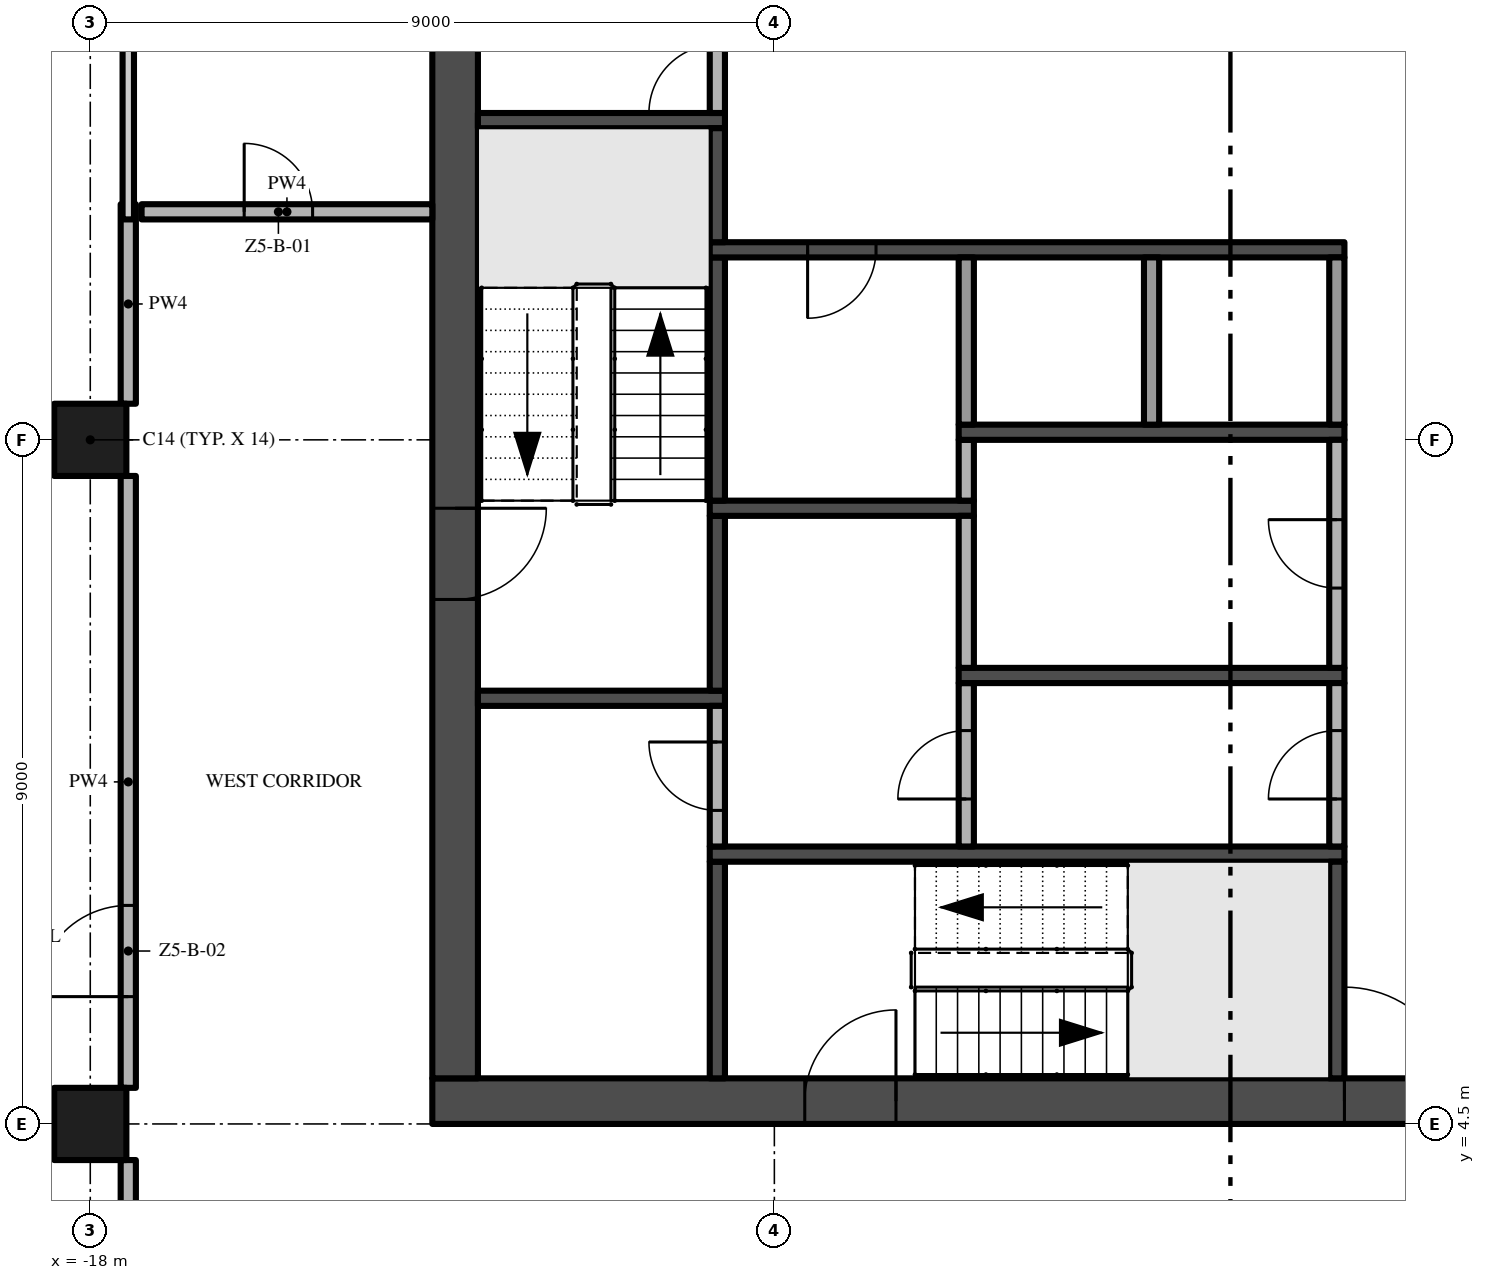
"""IFC4 building model, lengths in metres.
Left out: names, types, materials, properties, quantities, classifications, styles, units other than length and angle.
Written with IfcOpenShell. Run it as: python <this file> out.ifc"""

import sys

from ifc_helpers import new_model, si_unit, direction, frame, frame_2d, origin, origin_2d, place, context, subcontext, project, spatial, rectangle, extrude, element, fill, save


model = new_model("IFC4")
c1 = context("Model", 3, precision=1e-05, world=origin(), true_north=direction((0.0, 1.0)))
c2 = subcontext(c1, "Body", "Model", "MODEL_VIEW")
j1 = project(units=[si_unit("LENGTHUNIT", "METRE"), si_unit("PLANEANGLEUNIT", "RADIAN")], contexts=[c1])
p1 = place(None, origin())
s1 = spatial("IfcSite", under=j1, at=p1, CompositionType="ELEMENT")
p2 = place(p1, origin())
s2 = spatial("IfcBuilding", under=s1, at=p2, CompositionType="ELEMENT")
p3 = place(p2, frame((0.0, 0.0, 257.8)))
s3 = spatial("IfcBuildingStorey", under=s2, at=p3, CompositionType="ELEMENT", Elevation=257.8)
p4 = place(p3, frame((-13.5, 4.8, -0.3), z_axis=(0.0, 0.0, 1.0), x_axis=(1.0, 0.0, 0.0)))
e1 = element("IfcWall", 1, at=p4, inside=s3, PredefinedType="SHEAR", context=c2, shape_type="SweptSolid", body=[
    extrude(rectangle(XDim=27.0, YDim=0.6, at=frame_2d((13.5, 0.0))), origin(), (0.0, 0.0, 1.0), 3.8),
])
p5 = place(p4, frame((12.0, 0.0, 0.3)))
e2 = element("IfcOpeningElement", 2, at=p5, cuts=e1, PredefinedType="OPENING", context=c2, shape_type="SweptSolid", body=[
    extrude(rectangle(XDim=3.0, YDim=2.4, at=frame_2d((1.5, 1.2))), frame((0.0, 0.31, 0.0), z_axis=(0.0, -1.0, 0.0), x_axis=(1.0, 0.0, 0.0)), (0.0, 0.0, 1.0), 0.62),
])
p6 = place(p4, frame((4.9, 0.0, 0.3)))
e3 = element("IfcOpeningElement", 3, at=p6, cuts=e1, PredefinedType="OPENING", context=c2, shape_type="SweptSolid", body=[
    extrude(rectangle(XDim=1.2, YDim=2.2, at=frame_2d((0.6, 1.1))), frame((0.0, 0.31, 0.0), z_axis=(0.0, -1.0, 0.0), x_axis=(1.0, 0.0, 0.0)), (0.0, 0.0, 1.0), 0.62),
])
p7 = place(p4, frame((20.75, 0.0, 0.3)))
e4 = element("IfcOpeningElement", 4, at=p7, cuts=e1, PredefinedType="OPENING", context=c2, shape_type="SweptSolid", body=[
    extrude(rectangle(XDim=1.5, YDim=2.2, at=frame_2d((0.75, 1.1))), frame((0.0, 0.31, 0.0), z_axis=(0.0, -1.0, 0.0), x_axis=(1.0, 0.0, 0.0)), (0.0, 0.0, 1.0), 0.62),
])
p8 = place(p4, frame((17.4, 0.0, 0.3)))
e5 = element("IfcOpeningElement", 5, at=p8, cuts=e1, PredefinedType="OPENING", context=c2, shape_type="SweptSolid", body=[
    extrude(rectangle(XDim=1.2, YDim=2.2, at=frame_2d((0.6, 1.1))), frame((0.0, 0.31, 0.0), z_axis=(0.0, -1.0, 0.0), x_axis=(1.0, 0.0, 0.0)), (0.0, 0.0, 1.0), 0.62),
])
p9 = place(p3, frame((-13.2, 21.9, -0.3), z_axis=(0.0, 0.0, 1.0), x_axis=(0.0, -1.0, 0.0)))
e6 = element("IfcWall", 6, at=p9, inside=s3, PredefinedType="SHEAR", context=c2, shape_type="SweptSolid", body=[
    extrude(rectangle(XDim=16.8, YDim=0.6, at=frame_2d((8.4, 0.0))), origin(), (0.0, 0.0, 1.0), 3.8),
])
p10 = place(p9, frame((9.3, 0.0, 0.3)))
e7 = element("IfcOpeningElement", 7, at=p10, cuts=e6, PredefinedType="OPENING", context=c2, shape_type="SweptSolid", body=[
    extrude(rectangle(XDim=1.2, YDim=2.2, at=frame_2d((0.6, 1.1))), frame((0.0, 0.31, 0.0), z_axis=(0.0, -1.0, 0.0), x_axis=(1.0, 0.0, 0.0)), (0.0, 0.0, 1.0), 0.62),
])
for number, where, z_axis, x_axis in (
    (8, (-18.0, 13.5, 0.0), (0.0, 0.0, 1.0), (1.0, 0.0, 0.0)),
    (9, (-18.0, 4.5, 0.0), (0.0, 0.0, 1.0), (1.0, 0.0, 0.0)),
):
    element("IfcColumn", number, at=place(p3, frame(where, z_axis=z_axis, x_axis=x_axis)), inside=s3, PredefinedType="COLUMN", context=c2, shape_type="SweptSolid", body=[
        extrude(rectangle(XDim=0.95, YDim=0.95, at=origin_2d()), origin(), (0.0, 0.0, 1.0), 3.5),
    ])
for number, where, z_axis, x_axis in (
    (10, (-12.9, 10.1, 0.0), (0.0, 0.0, 1.0), (1.0, 0.0, 0.0)),
    (11, (-12.9, 17.7, 0.0), (0.0, 0.0, 1.0), (1.0, 0.0, 0.0)),
):
    element("IfcWall", number, at=place(p3, frame(where, z_axis=z_axis, x_axis=x_axis)), inside=s3, PredefinedType="SHEAR", context=c2, shape_type="SweptSolid", body=[
        extrude(rectangle(XDim=3.25, YDim=0.2, at=frame_2d((1.625, 0.0))), origin(), (0.0, 0.0, 1.0), 3.5),
    ])
p11 = place(p3, frame((-9.75, 5.1, 0.0), z_axis=(0.0, 0.0, 1.0), x_axis=(0.0, 1.0, 0.0)))
e12 = element("IfcWall", 12, at=p11, inside=s3, PredefinedType="SHEAR", context=c2, shape_type="SweptSolid", body=[
    extrude(rectangle(XDim=2.85, YDim=0.2, at=frame_2d((1.425, 0.0))), origin(), (0.0, 0.0, 1.0), 3.5),
])
p12 = place(p3, frame((-9.85, 8.05, 0.0), z_axis=(0.0, 0.0, 1.0), x_axis=(1.0, 0.0, 0.0)))
e13 = element("IfcWall", 13, at=p12, inside=s3, PredefinedType="SHEAR", context=c2, shape_type="SweptSolid", body=[
    extrude(rectangle(XDim=8.35, YDim=0.2, at=frame_2d((4.175, 0.0))), origin(), (0.0, 0.0, 1.0), 3.5),
])
p13 = place(p3, frame((-9.75, 8.15, 0.0), z_axis=(0.0, 0.0, 1.0), x_axis=(0.0, 1.0, 0.0)))
e14 = element("IfcWall", 14, at=p13, inside=s3, PredefinedType="PARTITIONING", context=c2, shape_type="SweptSolid", body=[
    extrude(rectangle(XDim=1.85, YDim=0.2, at=frame_2d((0.925, 0.0))), origin(), (0.0, 0.0, 1.0), 3.5),
])
p14 = place(p13, frame((0.475, 0.0, 0.0)))
e15 = element("IfcOpeningElement", 15, at=p14, cuts=e14, PredefinedType="OPENING", context=c2, shape_type="SweptSolid", body=[
    extrude(rectangle(XDim=0.9, YDim=2.1, at=frame_2d((0.45, 1.05))), frame((0.0, 0.11, 0.0), z_axis=(0.0, -1.0, 0.0), x_axis=(1.0, 0.0, 0.0)), (0.0, 0.0, 1.0), 0.22),
])
p15 = place(p3, frame((-9.75, 10.2, 0.0), z_axis=(0.0, 0.0, 1.0), x_axis=(0.0, 1.0, 0.0)))
e16 = element("IfcWall", 16, at=p15, inside=s3, PredefinedType="SHEAR", context=c2, shape_type="SweptSolid", body=[
    extrude(rectangle(XDim=2.3, YDim=0.2, at=frame_2d((1.15, 0.0))), origin(), (0.0, 0.0, 1.0), 3.5),
])
p16 = place(p3, frame((-9.85, 12.6, 0.0), z_axis=(0.0, 0.0, 1.0), x_axis=(1.0, 0.0, 0.0)))
e17 = element("IfcWall", 17, at=p16, inside=s3, PredefinedType="SHEAR", context=c2, shape_type="SweptSolid", body=[
    extrude(rectangle(XDim=3.475, YDim=0.2, at=frame_2d((1.738, 0.0))), origin(), (0.0, 0.0, 1.0), 3.5),
])
p17 = place(p3, frame((-9.75, 12.7, 0.0), z_axis=(0.0, 0.0, 1.0), x_axis=(0.0, 1.0, 0.0)))
e18 = element("IfcWall", 18, at=p17, inside=s3, PredefinedType="SHEAR", context=c2, shape_type="SweptSolid", body=[
    extrude(rectangle(XDim=3.2, YDim=0.2, at=frame_2d((1.6, 0.0))), origin(), (0.0, 0.0, 1.0), 3.5),
])
p18 = place(p3, frame((-1.5, 16.0, 0.0), z_axis=(0.0, 0.0, 1.0), x_axis=(-1.0, 0.0, 0.0)))
e19 = element("IfcWall", 19, at=p18, inside=s3, PredefinedType="SHEAR", context=c2, shape_type="SweptSolid", body=[
    extrude(rectangle(XDim=8.35, YDim=0.2, at=frame_2d((4.175, 0.0))), origin(), (0.0, 0.0, 1.0), 3.5),
])
p19 = place(p18, frame((6.162, 0.0, 0.0)))
e20 = element("IfcOpeningElement", 20, at=p19, cuts=e19, PredefinedType="OPENING", context=c2, shape_type="SweptSolid", body=[
    extrude(rectangle(XDim=0.9, YDim=2.1, at=frame_2d((0.45, 1.05))), frame((0.0, 0.11, 0.0), z_axis=(0.0, -1.0, 0.0), x_axis=(1.0, 0.0, 0.0)), (0.0, 0.0, 1.0), 0.22),
])
p20 = place(p3, frame((-9.75, 16.1, 0.0), z_axis=(0.0, 0.0, 1.0), x_axis=(0.0, 1.0, 0.0)))
e21 = element("IfcWall", 21, at=p20, inside=s3, PredefinedType="SHEAR", context=c2, shape_type="SweptSolid", body=[
    extrude(rectangle(XDim=1.5, YDim=0.2, at=frame_2d((0.75, 0.0))), origin(), (0.0, 0.0, 1.0), 3.5),
])
p21 = place(p3, frame((-9.75, 17.8, 0.0), z_axis=(0.0, 0.0, 1.0), x_axis=(0.0, 1.0, 0.0)))
e22 = element("IfcWall", 22, at=p21, inside=s3, PredefinedType="PARTITIONING", context=c2, shape_type="SweptSolid", body=[
    extrude(rectangle(XDim=1.4, YDim=0.2, at=frame_2d((0.7, 0.0))), origin(), (0.0, 0.0, 1.0), 3.5),
])
p22 = place(p21, origin())
e23 = element("IfcOpeningElement", 23, at=p22, cuts=e22, PredefinedType="OPENING", context=c2, shape_type="SweptSolid", body=[
    extrude(rectangle(XDim=0.9, YDim=2.1, at=frame_2d((0.45, 1.05))), frame((0.0, 0.11, 0.0), z_axis=(0.0, -1.0, 0.0), x_axis=(1.0, 0.0, 0.0)), (0.0, 0.0, 1.0), 0.22),
])
p23 = place(p3, frame((-6.475, 8.15, 0.0), z_axis=(0.0, 0.0, 1.0), x_axis=(0.0, 1.0, 0.0)))
e24 = element("IfcWall", 24, at=p23, inside=s3, PredefinedType="PARTITIONING", context=c2, shape_type="SweptSolid", body=[
    extrude(rectangle(XDim=2.15, YDim=0.2, at=frame_2d((1.075, 0.0))), origin(), (0.0, 0.0, 1.0), 3.5),
])
p24 = place(p23, frame((0.625, 0.0, 0.0)))
e25 = element("IfcOpeningElement", 25, at=p24, cuts=e24, PredefinedType="OPENING", context=c2, shape_type="SweptSolid", body=[
    extrude(rectangle(XDim=0.9, YDim=2.1, at=frame_2d((0.45, 1.05))), frame((0.0, 0.11, 0.0), z_axis=(0.0, -1.0, 0.0), x_axis=(1.0, 0.0, 0.0)), (0.0, 0.0, 1.0), 0.22),
])
p25 = place(p3, frame((-6.575, 10.4, 0.0), z_axis=(0.0, 0.0, 1.0), x_axis=(1.0, 0.0, 0.0)))
e26 = element("IfcWall", 26, at=p25, inside=s3, PredefinedType="SHEAR", context=c2, shape_type="SweptSolid", body=[
    extrude(rectangle(XDim=5.075, YDim=0.2, at=frame_2d((2.538, 0.0))), origin(), (0.0, 0.0, 1.0), 3.5),
])
p26 = place(p3, frame((-6.475, 10.5, 0.0), z_axis=(0.0, 0.0, 1.0), x_axis=(0.0, 1.0, 0.0)))
e27 = element("IfcWall", 27, at=p26, inside=s3, PredefinedType="PARTITIONING", context=c2, shape_type="SweptSolid", body=[
    extrude(rectangle(XDim=2.0, YDim=0.2, at=frame_2d((1.0, 0.0))), origin(), (0.0, 0.0, 1.0), 3.5),
])
p27 = place(p3, frame((-6.475, 12.7, 0.0), z_axis=(0.0, 0.0, 1.0), x_axis=(0.0, 1.0, 0.0)))
e28 = element("IfcWall", 28, at=p27, inside=s3, PredefinedType="PARTITIONING", context=c2, shape_type="SweptSolid", body=[
    extrude(rectangle(XDim=0.8, YDim=0.2, at=frame_2d((0.4, 0.0))), origin(), (0.0, 0.0, 1.0), 3.5),
])
p28 = place(p3, frame((-6.575, 13.6, 0.0), z_axis=(0.0, 0.0, 1.0), x_axis=(1.0, 0.0, 0.0)))
e29 = element("IfcWall", 29, at=p28, inside=s3, PredefinedType="SHEAR", context=c2, shape_type="SweptSolid", body=[
    extrude(rectangle(XDim=5.075, YDim=0.2, at=frame_2d((2.538, 0.0))), origin(), (0.0, 0.0, 1.0), 3.5),
])
for number, where, z_axis, x_axis in (
    (30, (-6.475, 13.7, 0.0), (0.0, 0.0, 1.0), (0.0, 1.0, 0.0)),
    (31, (-4.037, 13.7, 0.0), (0.0, 0.0, 1.0), (0.0, 1.0, 0.0)),
):
    element("IfcWall", number, at=place(p3, frame(where, z_axis=z_axis, x_axis=x_axis)), inside=s3, PredefinedType="PARTITIONING", context=c2, shape_type="SweptSolid", body=[
        extrude(rectangle(XDim=2.2, YDim=0.2, at=frame_2d((1.1, 0.0))), origin(), (0.0, 0.0, 1.0), 3.5),
    ])
p29 = place(p3, frame((-1.6, 5.1, 0.0), z_axis=(0.0, 0.0, 1.0), x_axis=(0.0, 1.0, 0.0)))
e32 = element("IfcWall", 32, at=p29, inside=s3, PredefinedType="SHEAR", context=c2, shape_type="SweptSolid", body=[
    extrude(rectangle(XDim=2.85, YDim=0.2, at=frame_2d((1.425, 0.0))), origin(), (0.0, 0.0, 1.0), 3.5),
])
p30 = place(p3, frame((-1.6, 8.15, 0.0), z_axis=(0.0, 0.0, 1.0), x_axis=(0.0, 1.0, 0.0)))
e33 = element("IfcWall", 33, at=p30, inside=s3, PredefinedType="PARTITIONING", context=c2, shape_type="SweptSolid", body=[
    extrude(rectangle(XDim=2.15, YDim=0.2, at=frame_2d((1.075, 0.0))), origin(), (0.0, 0.0, 1.0), 3.5),
])
p31 = place(p30, frame((0.625, 0.0, 0.0)))
e34 = element("IfcOpeningElement", 34, at=p31, cuts=e33, PredefinedType="OPENING", context=c2, shape_type="SweptSolid", body=[
    extrude(rectangle(XDim=0.9, YDim=2.1, at=frame_2d((0.45, 1.05))), frame((0.0, 0.11, 0.0), z_axis=(0.0, -1.0, 0.0), x_axis=(1.0, 0.0, 0.0)), (0.0, 0.0, 1.0), 0.22),
])
p32 = place(p3, frame((-1.6, 10.5, 0.0), z_axis=(0.0, 0.0, 1.0), x_axis=(0.0, 1.0, 0.0)))
e35 = element("IfcWall", 35, at=p32, inside=s3, PredefinedType="PARTITIONING", context=c2, shape_type="SweptSolid", body=[
    extrude(rectangle(XDim=3.0, YDim=0.2, at=frame_2d((1.5, 0.0))), origin(), (0.0, 0.0, 1.0), 3.5),
])
p33 = place(p32, frame((1.05, 0.0, 0.0)))
e36 = element("IfcOpeningElement", 36, at=p33, cuts=e35, PredefinedType="OPENING", context=c2, shape_type="SweptSolid", body=[
    extrude(rectangle(XDim=0.9, YDim=2.1, at=frame_2d((0.45, 1.05))), frame((0.0, 0.11, 0.0), z_axis=(0.0, -1.0, 0.0), x_axis=(1.0, 0.0, 0.0)), (0.0, 0.0, 1.0), 0.22),
])
p34 = place(p3, frame((-1.6, 13.7, 0.0), z_axis=(0.0, 0.0, 1.0), x_axis=(0.0, 1.0, 0.0)))
e37 = element("IfcWall", 37, at=p34, inside=s3, PredefinedType="PARTITIONING", context=c2, shape_type="SweptSolid", body=[
    extrude(rectangle(XDim=2.2, YDim=0.2, at=frame_2d((1.1, 0.0))), origin(), (0.0, 0.0, 1.0), 3.5),
])
p35 = place(p3, frame((-17.325, 16.5, 0.0), z_axis=(0.0, 0.0, 1.0), x_axis=(1.0, 0.0, 0.0)))
e38 = element("IfcWall", 38, at=p35, inside=s3, PredefinedType="PARTITIONING", context=c2, shape_type="SweptSolid", body=[
    extrude(rectangle(XDim=3.825, YDim=0.2, at=frame_2d((1.913, 0.0))), origin(), (0.0, 0.0, 1.0), 3.5),
])
p36 = place(p35, frame((1.35, 0.0, 0.0)))
e39 = element("IfcOpeningElement", 39, at=p36, cuts=e38, PredefinedType="OPENING", context=c2, shape_type="SweptSolid", body=[
    extrude(rectangle(XDim=0.9, YDim=2.1, at=frame_2d((0.45, 1.05))), frame((0.0, 0.11, 0.0), z_axis=(0.0, -1.0, 0.0), x_axis=(1.0, 0.0, 0.0)), (0.0, 0.0, 1.0), 0.22),
])
p37 = place(p3, frame((-17.5, -0.2, 0.0), z_axis=(0.0, 0.0, 1.0), x_axis=(0.0, 1.0, 0.0)))
e40 = element("IfcWall", 40, at=p37, inside=s3, PredefinedType="PARTITIONING", context=c2, shape_type="SweptSolid", body=[
    extrude(rectangle(XDim=4.225, YDim=0.2, at=frame_2d((2.112, 0.0))), origin(), (0.0, 0.0, 1.0), 3.5),
])
p38 = place(p3, frame((-17.5, 4.975, 0.0), z_axis=(0.0, 0.0, 1.0), x_axis=(0.0, 1.0, 0.0)))
e41 = element("IfcWall", 41, at=p38, inside=s3, PredefinedType="PARTITIONING", context=c2, shape_type="SweptSolid", body=[
    extrude(rectangle(XDim=8.05, YDim=0.2, at=frame_2d((4.025, 0.0))), origin(), (0.0, 0.0, 1.0), 3.5),
])
p39 = place(p38, frame((1.2, 0.0, 0.0)))
e42 = element("IfcOpeningElement", 42, at=p39, cuts=e41, PredefinedType="OPENING", context=c2, shape_type="SweptSolid", body=[
    extrude(rectangle(XDim=1.2, YDim=2.4, at=frame_2d((0.6, 1.2))), frame((0.0, 0.11, 0.0), z_axis=(0.0, -1.0, 0.0), x_axis=(1.0, 0.0, 0.0)), (0.0, 0.0, 1.0), 0.22),
])
p40 = place(p3, frame((-17.5, 13.975, 0.0), z_axis=(0.0, 0.0, 1.0), x_axis=(0.0, 1.0, 0.0)))
e43 = element("IfcWall", 43, at=p40, inside=s3, PredefinedType="PARTITIONING", context=c2, shape_type="SweptSolid", body=[
    extrude(rectangle(XDim=2.625, YDim=0.2, at=frame_2d((1.312, 0.0))), origin(), (0.0, 0.0, 1.0), 3.5),
])
p41 = place(p3, frame((-17.5, 16.4, 0.0), z_axis=(0.0, 0.0, 1.0), x_axis=(0.0, 1.0, 0.0)))
e44 = element("IfcWall", 44, at=p41, inside=s3, PredefinedType="PARTITIONING", context=c2, shape_type="SweptSolid", body=[
    extrude(rectangle(XDim=5.2, YDim=0.15, at=frame_2d((2.6, 0.0))), origin(), (0.0, 0.0, 1.0), 3.5),
])
p42 = place(p5, frame((3.0, 0.0, 0.0), z_axis=(0.0, 0.0, 1.0), x_axis=(-1.0, 0.0, 0.0)))
e45 = element("IfcDoor", 45, at=p42, inside=s3, OperationType="DOUBLE_DOOR_SINGLE_SWING", PredefinedType="DOOR", context=c2, shape_type="SweptSolid", body=[
    extrude(rectangle(XDim=3.0, YDim=2.4, at=frame_2d((1.5, 1.2))), frame((0.0, 0.025, 0.0), z_axis=(0.0, -1.0, 0.0), x_axis=(1.0, 0.0, 0.0)), (0.0, 0.0, 1.0), 0.05),
])
fill(e2, e45)
p43 = place(p10, frame((1.2, 0.0, 0.0), z_axis=(0.0, 0.0, 1.0), x_axis=(-1.0, 0.0, 0.0)))
e46 = element("IfcDoor", 46, at=p43, inside=s3, OperationType="SINGLE_SWING_RIGHT", PredefinedType="DOOR", context=c2, shape_type="SweptSolid", body=[
    extrude(rectangle(XDim=1.2, YDim=2.2, at=frame_2d((0.6, 1.1))), frame((0.0, 0.025, 0.0), z_axis=(0.0, -1.0, 0.0), x_axis=(1.0, 0.0, 0.0)), (0.0, 0.0, 1.0), 0.05),
])
fill(e7, e46)
p44 = place(p6, frame((1.2, 0.0, 0.0), z_axis=(0.0, 0.0, 1.0), x_axis=(-1.0, 0.0, 0.0)))
e47 = element("IfcDoor", 47, at=p44, inside=s3, OperationType="SINGLE_SWING_LEFT", PredefinedType="DOOR", context=c2, shape_type="SweptSolid", body=[
    extrude(rectangle(XDim=1.2, YDim=2.2, at=frame_2d((0.6, 1.1))), frame((0.0, 0.025, 0.0), z_axis=(0.0, -1.0, 0.0), x_axis=(1.0, 0.0, 0.0)), (0.0, 0.0, 1.0), 0.05),
])
fill(e3, e47)
p45 = place(p19, origin())
e48 = element("IfcDoor", 48, at=p45, inside=s3, OperationType="SINGLE_SWING_RIGHT", PredefinedType="DOOR", context=c2, shape_type="SweptSolid", body=[
    extrude(rectangle(XDim=0.9, YDim=2.1, at=frame_2d((0.45, 1.05))), frame((0.0, 0.025, 0.0), z_axis=(0.0, -1.0, 0.0), x_axis=(1.0, 0.0, 0.0)), (0.0, 0.0, 1.0), 0.05),
])
fill(e20, e48)
p46 = place(p31, origin())
e49 = element("IfcDoor", 49, at=p46, inside=s3, OperationType="SINGLE_SWING_LEFT", PredefinedType="DOOR", context=c2, shape_type="SweptSolid", body=[
    extrude(rectangle(XDim=0.9, YDim=2.1, at=frame_2d((0.45, 1.05))), frame((0.0, 0.025, 0.0), z_axis=(0.0, -1.0, 0.0), x_axis=(1.0, 0.0, 0.0)), (0.0, 0.0, 1.0), 0.05),
])
fill(e34, e49)
p47 = place(p33, origin())
e50 = element("IfcDoor", 50, at=p47, inside=s3, OperationType="SINGLE_SWING_RIGHT", PredefinedType="DOOR", context=c2, shape_type="SweptSolid", body=[
    extrude(rectangle(XDim=0.9, YDim=2.1, at=frame_2d((0.45, 1.05))), frame((0.0, 0.025, 0.0), z_axis=(0.0, -1.0, 0.0), x_axis=(1.0, 0.0, 0.0)), (0.0, 0.0, 1.0), 0.05),
])
fill(e36, e50)
p48 = place(p22, origin())
e51 = element("IfcDoor", 51, at=p48, inside=s3, OperationType="SINGLE_SWING_LEFT", PredefinedType="DOOR", context=c2, shape_type="SweptSolid", body=[
    extrude(rectangle(XDim=0.9, YDim=2.1, at=frame_2d((0.45, 1.05))), frame((0.0, 0.025, 0.0), z_axis=(0.0, -1.0, 0.0), x_axis=(1.0, 0.0, 0.0)), (0.0, 0.0, 1.0), 0.05),
])
fill(e23, e51)
p49 = place(p24, origin())
e52 = element("IfcDoor", 52, at=p49, inside=s3, OperationType="SINGLE_SWING_LEFT", PredefinedType="DOOR", context=c2, shape_type="SweptSolid", body=[
    extrude(rectangle(XDim=0.9, YDim=2.1, at=frame_2d((0.45, 1.05))), frame((0.0, 0.025, 0.0), z_axis=(0.0, -1.0, 0.0), x_axis=(1.0, 0.0, 0.0)), (0.0, 0.0, 1.0), 0.05),
])
fill(e25, e52)
p50 = place(p14, origin())
e53 = element("IfcDoor", 53, at=p50, inside=s3, OperationType="SINGLE_SWING_RIGHT", PredefinedType="DOOR", context=c2, shape_type="SweptSolid", body=[
    extrude(rectangle(XDim=0.9, YDim=2.1, at=frame_2d((0.45, 1.05))), frame((0.0, 0.025, 0.0), z_axis=(0.0, -1.0, 0.0), x_axis=(1.0, 0.0, 0.0)), (0.0, 0.0, 1.0), 0.05),
])
fill(e15, e53)
p51 = place(p36, origin())
e54 = element("IfcDoor", 54, at=p51, inside=s3, OperationType="SINGLE_SWING_LEFT", PredefinedType="DOOR", context=c2, shape_type="SweptSolid", body=[
    extrude(rectangle(XDim=0.9, YDim=2.1, at=frame_2d((0.45, 1.05))), frame((0.0, 0.025, 0.0), z_axis=(0.0, -1.0, 0.0), x_axis=(1.0, 0.0, 0.0)), (0.0, 0.0, 1.0), 0.05),
])
fill(e39, e54)
p52 = place(p39, origin())
e55 = element("IfcDoor", 55, at=p52, inside=s3, OperationType="SINGLE_SWING_LEFT", PredefinedType="DOOR", context=c2, shape_type="SweptSolid", body=[
    extrude(rectangle(XDim=1.2, YDim=2.4, at=frame_2d((0.6, 1.2))), frame((0.0, 0.025, 0.0), z_axis=(0.0, -1.0, 0.0), x_axis=(1.0, 0.0, 0.0)), (0.0, 0.0, 1.0), 0.05),
])
fill(e42, e55)
save(model, sys.argv[1])
